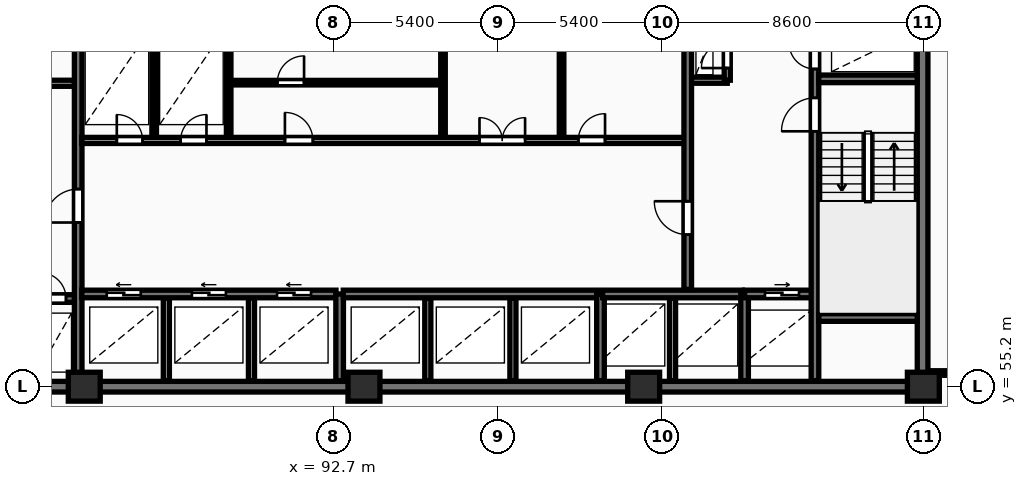
"""IFC4 building model, lengths in metres.
Left out: names, types, materials, properties, quantities, classifications, styles, units other than length and angle.
Written with IfcOpenShell. Run it as: python <this file> out.ifc"""

import sys

from ifc_helpers import new_model, si_unit, direction, frame, frame_2d, origin, origin_2d, place, context, subcontext, project, spatial, rectangle, extrude, element, fill, save


model = new_model("IFC4")
c1 = context("Model", 3, precision=1e-05, world=origin(), true_north=direction((0.0, 1.0)))
c2 = subcontext(c1, "Body", "Model", "MODEL_VIEW")
j1 = project(units=[si_unit("LENGTHUNIT", "METRE"), si_unit("PLANEANGLEUNIT", "RADIAN")], contexts=[c1])
p1 = place(None, origin())
s1 = spatial("IfcSite", under=j1, at=p1, CompositionType="ELEMENT")
p2 = place(p1, origin())
s2 = spatial("IfcBuilding", under=s1, at=p2, CompositionType="ELEMENT")
p3 = place(p2, frame((0.0, 0.0, 24.0)))
s3 = spatial("IfcBuildingStorey", under=s2, at=p3, CompositionType="ELEMENT", Elevation=24.0)
for number, where, z_axis, x_axis in (
    (1, (84.5, 55.2, 0.0), (0.0, 0.0, 1.0), (1.0, 0.0, 0.0)),
    (2, (93.7, 55.2, 0.0), (0.0, 0.0, 1.0), (1.0, 0.0, 0.0)),
    (3, (102.9, 55.2, 0.0), (0.0, 0.0, 1.0), (1.0, 0.0, 0.0)),
    (4, (112.1, 55.2, 0.0), (0.0, 0.0, 1.0), (1.0, 0.0, 0.0)),
):
    element("IfcColumn", number, at=place(p3, frame(where, z_axis=z_axis, x_axis=x_axis)), inside=s3, PredefinedType="COLUMN", context=c2, shape_type="SweptSolid", body=[
        extrude(rectangle(XDim=1.05, YDim=0.95, at=origin_2d()), origin(), (0.0, 0.0, 1.0), 3.25),
    ])
p4 = place(p3, frame((75.95, 55.2, 0.0), z_axis=(0.0, 0.0, 1.0), x_axis=(1.0, 0.0, 0.0)))
e5 = element("IfcWall", 5, at=p4, inside=s3, PredefinedType="SHEAR", context=c2, shape_type="SweptSolid", body=[
    extrude(rectangle(XDim=36.3, YDim=0.35, at=frame_2d((18.15, 0.0))), origin(), (0.0, 0.0, 1.0), 3.25),
])
p5 = place(p3, frame((112.075, 55.375, 0.0), z_axis=(0.0, 0.0, 1.0), x_axis=(0.0, 1.0, 0.0)))
e6 = element("IfcWall", 6, at=p5, inside=s3, PredefinedType="SHEAR", context=c2, shape_type="SweptSolid", body=[
    extrude(rectangle(XDim=11.65, YDim=0.35, at=frame_2d((5.825, 0.0))), origin(), (0.0, 0.0, 1.0), 3.25),
])
p6 = place(p3, frame((79.79, 58.1, 0.0), z_axis=(0.0, 0.0, 1.0), x_axis=(1.0, 0.0, 0.0)))
e7 = element("IfcWall", 7, at=p6, inside=s3, PredefinedType="SHEAR", context=c2, shape_type="SweptSolid", body=[
    extrude(rectangle(XDim=4.39, YDim=0.25, at=frame_2d((2.195, 0.0))), origin(), (0.0, 0.0, 1.0), 3.25),
])
p7 = place(p6, frame((1.05, 0.0, 0.0)))
e8 = element("IfcOpeningElement", 8, at=p7, cuts=e7, PredefinedType="OPENING", context=c2, shape_type="SweptSolid", body=[
    extrude(rectangle(XDim=1.12, YDim=2.12, at=frame_2d((0.56, 1.06))), frame((0.0, 0.135, 0.0), z_axis=(0.0, -1.0, 0.0), x_axis=(1.0, 0.0, 0.0)), (0.0, 0.0, 1.0), 0.27),
])
p8 = place(p6, frame((3.26, 0.0, 0.0)))
e9 = element("IfcOpeningElement", 9, at=p8, cuts=e7, PredefinedType="OPENING", context=c2, shape_type="SweptSolid", body=[
    extrude(rectangle(XDim=0.85, YDim=2.05, at=frame_2d((0.425, 1.025))), frame((0.0, 0.135, 0.0), z_axis=(0.0, -1.0, 0.0), x_axis=(1.0, 0.0, 0.0)), (0.0, 0.0, 1.0), 0.27),
])
p9 = place(p3, frame((79.79, 65.18, 0.0), z_axis=(0.0, 0.0, 1.0), x_axis=(1.0, 0.0, 0.0)))
e10 = element("IfcWall", 10, at=p9, inside=s3, PredefinedType="PARTITIONING", context=c2, shape_type="SweptSolid", body=[
    extrude(rectangle(XDim=4.39, YDim=0.2, at=frame_2d((2.195, 0.0))), origin(), (0.0, 0.0, 1.0), 2.97),
])
p10 = place(p9, frame((1.5, 0.0, 0.0)))
e11 = element("IfcOpeningElement", 11, at=p10, cuts=e10, PredefinedType="OPENING", context=c2, shape_type="SweptSolid", body=[
    extrude(rectangle(XDim=1.1, YDim=2.1, at=frame_2d((0.55, 1.05))), frame((0.0, 0.11, 0.0), z_axis=(0.0, -1.0, 0.0), x_axis=(1.0, 0.0, 0.0)), (0.0, 0.0, 1.0), 0.22),
])
p11 = place(p3, frame((84.3, 55.4, 0.0), z_axis=(0.0, 0.0, 1.0), x_axis=(0.0, 1.0, 0.0)))
e12 = element("IfcWall", 12, at=p11, inside=s3, PredefinedType="SHEAR", context=c2, shape_type="SweptSolid", body=[
    extrude(rectangle(XDim=11.6, YDim=0.25, at=frame_2d((5.8, 0.0))), origin(), (0.0, 0.0, 1.0), 3.25),
])
p12 = place(p11, frame((5.2, 0.0, 0.0)))
e13 = element("IfcOpeningElement", 13, at=p12, cuts=e12, PredefinedType="OPENING", context=c2, shape_type="SweptSolid", body=[
    extrude(rectangle(XDim=1.1, YDim=2.1, at=frame_2d((0.55, 1.05))), frame((0.0, 0.135, 0.0), z_axis=(0.0, -1.0, 0.0), x_axis=(1.0, 0.0, 0.0)), (0.0, 0.0, 1.0), 0.27),
])
for number, where, z_axis, x_axis in (
    (14, (87.2, 55.4, 0.0), (0.0, 0.0, 1.0), (0.0, 1.0, 0.0)),
    (15, (90.0, 55.4, 0.0), (0.0, 0.0, 1.0), (0.0, 1.0, 0.0)),
):
    element("IfcWall", number, at=place(p3, frame(where, z_axis=z_axis, x_axis=x_axis)), inside=s3, PredefinedType="PARTITIONING", context=c2, shape_type="SweptSolid", body=[
        extrude(rectangle(XDim=2.72, YDim=0.2, at=frame_2d((1.36, 0.0))), origin(), (0.0, 0.0, 1.0), 2.97),
    ])
p13 = place(p3, frame((84.42, 58.25, 0.0), z_axis=(0.0, 0.0, 1.0), x_axis=(1.0, 0.0, 0.0)))
e16 = element("IfcWall", 16, at=p13, inside=s3, PredefinedType="SHEAR", context=c2, shape_type="SweptSolid", body=[
    extrude(rectangle(XDim=8.36, YDim=0.25, at=frame_2d((4.18, 0.0))), origin(), (0.0, 0.0, 1.0), 3.25),
])
p14 = place(p13, frame((0.82, 0.0, 0.0)))
e17 = element("IfcOpeningElement", 17, at=p14, cuts=e16, PredefinedType="OPENING", context=c2, shape_type="SweptSolid", body=[
    extrude(rectangle(XDim=1.12, YDim=2.12, at=frame_2d((0.56, 1.06))), frame((0.0, 0.135, 0.0), z_axis=(0.0, -1.0, 0.0), x_axis=(1.0, 0.0, 0.0)), (0.0, 0.0, 1.0), 0.27),
])
p15 = place(p13, frame((3.62, 0.0, 0.0)))
e18 = element("IfcOpeningElement", 18, at=p15, cuts=e16, PredefinedType="OPENING", context=c2, shape_type="SweptSolid", body=[
    extrude(rectangle(XDim=1.12, YDim=2.12, at=frame_2d((0.56, 1.06))), frame((0.0, 0.135, 0.0), z_axis=(0.0, -1.0, 0.0), x_axis=(1.0, 0.0, 0.0)), (0.0, 0.0, 1.0), 0.27),
])
p16 = place(p13, frame((6.42, 0.0, 0.0)))
e19 = element("IfcOpeningElement", 19, at=p16, cuts=e16, PredefinedType="OPENING", context=c2, shape_type="SweptSolid", body=[
    extrude(rectangle(XDim=1.12, YDim=2.12, at=frame_2d((0.56, 1.06))), frame((0.0, 0.135, 0.0), z_axis=(0.0, -1.0, 0.0), x_axis=(1.0, 0.0, 0.0)), (0.0, 0.0, 1.0), 0.27),
])
p17 = place(p3, frame((92.9, 55.4, 0.0), z_axis=(0.0, 0.0, 1.0), x_axis=(0.0, 1.0, 0.0)))
e20 = element("IfcWall", 20, at=p17, inside=s3, PredefinedType="SHEAR", context=c2, shape_type="SweptSolid", body=[
    extrude(rectangle(XDim=2.85, YDim=0.25, at=frame_2d((1.425, 0.0))), origin(), (0.0, 0.0, 1.0), 3.25),
])
for number, where, z_axis, x_axis in (
    (21, (95.8, 55.4, 0.0), (0.0, 0.0, 1.0), (0.0, 1.0, 0.0)),
    (22, (98.6, 55.4, 0.0), (0.0, 0.0, 1.0), (0.0, 1.0, 0.0)),
):
    element("IfcWall", number, at=place(p3, frame(where, z_axis=z_axis, x_axis=x_axis)), inside=s3, PredefinedType="PARTITIONING", context=c2, shape_type="SweptSolid", body=[
        extrude(rectangle(XDim=2.72, YDim=0.2, at=frame_2d((1.36, 0.0))), origin(), (0.0, 0.0, 1.0), 2.97),
    ])
p18 = place(p3, frame((93.02, 58.25, 0.0), z_axis=(0.0, 0.0, 1.0), x_axis=(1.0, 0.0, 0.0)))
e23 = element("IfcWall", 23, at=p18, inside=s3, PredefinedType="SHEAR", context=c2, shape_type="SweptSolid", body=[
    extrude(rectangle(XDim=8.36, YDim=0.25, at=frame_2d((4.18, 0.0))), origin(), (0.0, 0.0, 1.0), 3.25),
])
p19 = place(p3, frame((101.48, 55.4, 0.0), z_axis=(0.0, 0.0, 1.0), x_axis=(0.0, 1.0, 0.0)))
e24 = element("IfcWall", 24, at=p19, inside=s3, PredefinedType="SHEAR", context=c2, shape_type="SweptSolid", body=[
    extrude(rectangle(XDim=2.85, YDim=0.25, at=frame_2d((1.425, 0.0))), origin(), (0.0, 0.0, 1.0), 3.25),
])
p20 = place(p3, frame((103.85, 55.4, 0.0), z_axis=(0.0, 0.0, 1.0), x_axis=(0.0, 1.0, 0.0)))
e25 = element("IfcWall", 25, at=p20, inside=s3, PredefinedType="PARTITIONING", context=c2, shape_type="SweptSolid", body=[
    extrude(rectangle(XDim=2.72, YDim=0.2, at=frame_2d((1.36, 0.0))), origin(), (0.0, 0.0, 1.0), 2.97),
])
p21 = place(p3, frame((101.55, 58.25, 0.0), z_axis=(0.0, 0.0, 1.0), x_axis=(1.0, 0.0, 0.0)))
e26 = element("IfcWall", 26, at=p21, inside=s3, PredefinedType="SHEAR", context=c2, shape_type="SweptSolid", body=[
    extrude(rectangle(XDim=4.6, YDim=0.25, at=frame_2d((2.3, 0.0))), origin(), (0.0, 0.0, 1.0), 3.25),
])
p22 = place(p3, frame((106.22, 55.4, 0.0), z_axis=(0.0, 0.0, 1.0), x_axis=(0.0, 1.0, 0.0)))
e27 = element("IfcWall", 27, at=p22, inside=s3, PredefinedType="SHEAR", context=c2, shape_type="SweptSolid", body=[
    extrude(rectangle(XDim=2.85, YDim=0.25, at=frame_2d((1.425, 0.0))), origin(), (0.0, 0.0, 1.0), 3.25),
])
p23 = place(p3, frame((106.22, 58.25, 0.0), z_axis=(0.0, 0.0, 1.0), x_axis=(1.0, 0.0, 0.0)))
e28 = element("IfcWall", 28, at=p23, inside=s3, PredefinedType="SHEAR", context=c2, shape_type="SweptSolid", body=[
    extrude(rectangle(XDim=2.46, YDim=0.25, at=frame_2d((1.23, 0.0))), origin(), (0.0, 0.0, 1.0), 3.25),
])
p24 = place(p23, frame((0.67, 0.0, 0.0)))
e29 = element("IfcOpeningElement", 29, at=p24, cuts=e28, PredefinedType="OPENING", context=c2, shape_type="SweptSolid", body=[
    extrude(rectangle(XDim=1.12, YDim=2.12, at=frame_2d((0.56, 1.06))), frame((0.0, 0.135, 0.0), z_axis=(0.0, -1.0, 0.0), x_axis=(1.0, 0.0, 0.0)), (0.0, 0.0, 1.0), 0.27),
])
for number, where, z_axis, x_axis in (
    (30, (86.8, 63.4, 0.0), (0.0, 0.0, 1.0), (0.0, 1.0, 0.0)),
    (31, (89.25, 63.4, 0.0), (0.0, 0.0, 1.0), (0.0, 1.0, 0.0)),
):
    element("IfcWall", number, at=place(p3, frame(where, z_axis=z_axis, x_axis=x_axis)), inside=s3, PredefinedType="PARTITIONING", context=c2, shape_type="SweptSolid", body=[
        extrude(rectangle(XDim=3.6, YDim=0.15, at=frame_2d((1.8, 0.0))), origin(), (0.0, 0.0, 1.0), 2.97),
    ])
p25 = place(p3, frame((89.25, 65.2, 0.0), z_axis=(0.0, 0.0, 1.0), x_axis=(1.0, 0.0, 0.0)))
e32 = element("IfcWall", 32, at=p25, inside=s3, PredefinedType="PARTITIONING", context=c2, shape_type="SweptSolid", body=[
    extrude(rectangle(XDim=7.05, YDim=0.15, at=frame_2d((3.525, 0.0))), origin(), (0.0, 0.0, 1.0), 2.97),
])
p26 = place(p25, frame((1.6, 0.0, 0.0)))
e33 = element("IfcOpeningElement", 33, at=p26, cuts=e32, PredefinedType="OPENING", context=c2, shape_type="SweptSolid", body=[
    extrude(rectangle(XDim=0.88, YDim=2.06, at=frame_2d((0.44, 1.03))), frame((0.0, 0.085, 0.0), z_axis=(0.0, -1.0, 0.0), x_axis=(1.0, 0.0, 0.0)), (0.0, 0.0, 1.0), 0.17),
])
for number, where, z_axis, x_axis in (
    (34, (96.3, 63.4, 0.0), (0.0, 0.0, 1.0), (0.0, 1.0, 0.0)),
    (35, (100.2, 63.4, 0.0), (0.0, 0.0, 1.0), (0.0, 1.0, 0.0)),
):
    element("IfcWall", number, at=place(p3, frame(where, z_axis=z_axis, x_axis=x_axis)), inside=s3, PredefinedType="PARTITIONING", context=c2, shape_type="SweptSolid", body=[
        extrude(rectangle(XDim=3.6, YDim=0.15, at=frame_2d((1.8, 0.0))), origin(), (0.0, 0.0, 1.0), 2.97),
    ])
p27 = place(p3, frame((84.42, 63.3, 0.0), z_axis=(0.0, 0.0, 1.0), x_axis=(1.0, 0.0, 0.0)))
e36 = element("IfcWall", 36, at=p27, inside=s3, PredefinedType="PARTITIONING", context=c2, shape_type="SweptSolid", body=[
    extrude(rectangle(XDim=19.83, YDim=0.2, at=frame_2d((9.915, 0.0))), origin(), (0.0, 0.0, 1.0), 2.97),
])
p28 = place(p27, frame((1.15, 0.0, 0.0)))
e37 = element("IfcOpeningElement", 37, at=p28, cuts=e36, PredefinedType="OPENING", context=c2, shape_type="SweptSolid", body=[
    extrude(rectangle(XDim=0.85, YDim=2.05, at=frame_2d((0.425, 1.025))), frame((0.0, 0.11, 0.0), z_axis=(0.0, -1.0, 0.0), x_axis=(1.0, 0.0, 0.0)), (0.0, 0.0, 1.0), 0.22),
])
p29 = place(p27, frame((3.25, 0.0, 0.0)))
e38 = element("IfcOpeningElement", 38, at=p29, cuts=e36, PredefinedType="OPENING", context=c2, shape_type="SweptSolid", body=[
    extrude(rectangle(XDim=0.85, YDim=2.05, at=frame_2d((0.425, 1.025))), frame((0.0, 0.11, 0.0), z_axis=(0.0, -1.0, 0.0), x_axis=(1.0, 0.0, 0.0)), (0.0, 0.0, 1.0), 0.22),
])
p30 = place(p27, frame((13.08, 0.0, 0.0)))
e39 = element("IfcOpeningElement", 39, at=p30, cuts=e36, PredefinedType="OPENING", context=c2, shape_type="SweptSolid", body=[
    extrude(rectangle(XDim=1.5, YDim=2.2, at=frame_2d((0.75, 1.1))), frame((0.0, 0.11, 0.0), z_axis=(0.0, -1.0, 0.0), x_axis=(1.0, 0.0, 0.0)), (0.0, 0.0, 1.0), 0.22),
])
p31 = place(p27, frame((6.68, 0.0, 0.0)))
e40 = element("IfcOpeningElement", 40, at=p31, cuts=e36, PredefinedType="OPENING", context=c2, shape_type="SweptSolid", body=[
    extrude(rectangle(XDim=0.92, YDim=2.08, at=frame_2d((0.46, 1.04))), frame((0.0, 0.11, 0.0), z_axis=(0.0, -1.0, 0.0), x_axis=(1.0, 0.0, 0.0)), (0.0, 0.0, 1.0), 0.22),
])
p32 = place(p27, frame((16.33, 0.0, 0.0)))
e41 = element("IfcOpeningElement", 41, at=p32, cuts=e36, PredefinedType="OPENING", context=c2, shape_type="SweptSolid", body=[
    extrude(rectangle(XDim=0.88, YDim=2.06, at=frame_2d((0.44, 1.03))), frame((0.0, 0.11, 0.0), z_axis=(0.0, -1.0, 0.0), x_axis=(1.0, 0.0, 0.0)), (0.0, 0.0, 1.0), 0.22),
])
p33 = place(p3, frame((104.45, 65.28, 0.0), z_axis=(0.0, 0.0, 1.0), x_axis=(1.0, 0.0, 0.0)))
e42 = element("IfcWall", 42, at=p33, inside=s3, PredefinedType="PARTITIONING", context=c2, shape_type="SweptSolid", body=[
    extrude(rectangle(XDim=1.2, YDim=0.2, at=frame_2d((0.6, 0.0))), origin(), (0.0, 0.0, 1.0), 2.97),
])
p34 = place(p3, frame((105.65, 65.28, 0.0), z_axis=(0.0, 0.0, 1.0), x_axis=(0.0, 1.0, 0.0)))
e43 = element("IfcWall", 43, at=p34, inside=s3, PredefinedType="PARTITIONING", context=c2, shape_type="SweptSolid", body=[
    extrude(rectangle(XDim=1.72, YDim=0.2, at=frame_2d((0.86, 0.0))), origin(), (0.0, 0.0, 1.0), 2.97),
])
p35 = place(p34, frame((0.4, 0.0, 0.0)))
e44 = element("IfcOpeningElement", 44, at=p35, cuts=e43, PredefinedType="OPENING", context=c2, shape_type="SweptSolid", body=[
    extrude(rectangle(XDim=0.85, YDim=2.05, at=frame_2d((0.425, 1.025))), frame((0.0, 0.11, 0.0), z_axis=(0.0, -1.0, 0.0), x_axis=(1.0, 0.0, 0.0)), (0.0, 0.0, 1.0), 0.22),
])
p36 = place(p3, frame((104.35, 58.4, 0.0), z_axis=(0.0, 0.0, 1.0), x_axis=(0.0, 1.0, 0.0)))
e45 = element("IfcWall", 45, at=p36, inside=s3, PredefinedType="SHEAR", context=c2, shape_type="SweptSolid", body=[
    extrude(rectangle(XDim=8.6, YDim=0.25, at=frame_2d((4.3, 0.0))), origin(), (0.0, 0.0, 1.0), 3.25),
])
p37 = place(p36, frame((1.8, 0.0, 0.0)))
e46 = element("IfcOpeningElement", 46, at=p37, cuts=e45, PredefinedType="OPENING", context=c2, shape_type="SweptSolid", body=[
    extrude(rectangle(XDim=1.1, YDim=2.1, at=frame_2d((0.55, 1.05))), frame((0.0, 0.135, 0.0), z_axis=(0.0, -1.0, 0.0), x_axis=(1.0, 0.0, 0.0)), (0.0, 0.0, 1.0), 0.27),
])
p38 = place(p3, frame((108.535, 55.4, 0.0), z_axis=(0.0, 0.0, 1.0), x_axis=(0.0, 1.0, 0.0)))
e47 = element("IfcWall", 47, at=p38, inside=s3, PredefinedType="SHEAR", context=c2, shape_type="SweptSolid", body=[
    extrude(rectangle(XDim=11.6, YDim=0.25, at=frame_2d((5.8, 0.0))), origin(), (0.0, 0.0, 1.0), 3.25),
])
p39 = place(p38, frame((8.2, 0.0, 0.0)))
e48 = element("IfcOpeningElement", 48, at=p39, cuts=e47, PredefinedType="OPENING", context=c2, shape_type="SweptSolid", body=[
    extrude(rectangle(XDim=1.1, YDim=2.1, at=frame_2d((0.55, 1.05))), frame((0.0, 0.135, 0.0), z_axis=(0.0, -1.0, 0.0), x_axis=(1.0, 0.0, 0.0)), (0.0, 0.0, 1.0), 0.27),
])
p40 = place(p38, frame((10.25, 0.0, 0.0)))
e49 = element("IfcOpeningElement", 49, at=p40, cuts=e47, PredefinedType="OPENING", context=c2, shape_type="SweptSolid", body=[
    extrude(rectangle(XDim=0.85, YDim=2.05, at=frame_2d((0.425, 1.025))), frame((0.0, 0.135, 0.0), z_axis=(0.0, -1.0, 0.0), x_axis=(1.0, 0.0, 0.0)), (0.0, 0.0, 1.0), 0.27),
])
for number, where, z_axis, x_axis in (
    (50, (108.66, 57.475, 0.0), (0.0, 0.0, 1.0), (1.0, 0.0, 0.0)),
    (51, (108.66, 65.325, 0.0), (0.0, 0.0, 1.0), (1.0, 0.0, 0.0)),
):
    element("IfcWall", number, at=place(p3, frame(where, z_axis=z_axis, x_axis=x_axis)), inside=s3, PredefinedType="SHEAR", context=c2, shape_type="SweptSolid", body=[
        extrude(rectangle(XDim=3.24, YDim=0.25, at=frame_2d((1.62, 0.0))), origin(), (0.0, 0.0, 1.0), 3.25),
    ])
p41 = place(p3, frame((112.27, 55.65, 0.0), z_axis=(0.0, 0.0, 1.0), x_axis=(1.0, 0.0, 0.0)))
e52 = element("IfcWall", 52, at=p41, inside=s3, PredefinedType="PARTITIONING", context=c2, shape_type="SweptSolid", body=[
    extrude(rectangle(XDim=6.76, YDim=0.15, at=frame_2d((3.38, 0.0))), origin(), (0.0, 0.0, 1.0), 2.97),
])
p42 = place(p41, frame((1.64, 0.0, 0.0)))
e53 = element("IfcOpeningElement", 53, at=p42, cuts=e52, PredefinedType="OPENING", context=c2, shape_type="SweptSolid", body=[
    extrude(rectangle(XDim=0.84, YDim=2.04, at=frame_2d((0.42, 1.02))), frame((0.0, 0.085, 0.0), z_axis=(0.0, -1.0, 0.0), x_axis=(1.0, 0.0, 0.0)), (0.0, 0.0, 1.0), 0.17),
])
p43 = place(p41, frame((3.16, 0.0, 0.0)))
e54 = element("IfcOpeningElement", 54, at=p43, cuts=e52, PredefinedType="OPENING", context=c2, shape_type="SweptSolid", body=[
    extrude(rectangle(XDim=0.88, YDim=2.06, at=frame_2d((0.44, 1.03))), frame((0.0, 0.085, 0.0), z_axis=(0.0, -1.0, 0.0), x_axis=(1.0, 0.0, 0.0)), (0.0, 0.0, 1.0), 0.17),
])
p44 = place(p8, origin())
e55 = element("IfcDoor", 55, at=p44, inside=s3, OperationType="SINGLE_SWING_LEFT", PredefinedType="DOOR", context=c2, shape_type="SweptSolid", body=[
    extrude(rectangle(XDim=0.85, YDim=2.05, at=frame_2d((0.425, 1.025))), frame((0.0, 0.025, 0.0), z_axis=(0.0, -1.0, 0.0), x_axis=(1.0, 0.0, 0.0)), (0.0, 0.0, 1.0), 0.05),
])
fill(e9, e55)
p45 = place(p12, origin())
e56 = element("IfcDoor", 56, at=p45, inside=s3, OperationType="SINGLE_SWING_LEFT", PredefinedType="DOOR", context=c2, shape_type="SweptSolid", body=[
    extrude(rectangle(XDim=1.1, YDim=2.1, at=frame_2d((0.55, 1.05))), frame((0.0, 0.025, 0.0), z_axis=(0.0, -1.0, 0.0), x_axis=(1.0, 0.0, 0.0)), (0.0, 0.0, 1.0), 0.05),
])
fill(e13, e56)
p46 = place(p14, origin())
e57 = element("IfcDoor", 57, at=p46, inside=s3, OperationType="SLIDING_TO_LEFT", PredefinedType="DOOR", context=c2, shape_type="SweptSolid", body=[
    extrude(rectangle(XDim=1.12, YDim=2.12, at=frame_2d((0.56, 1.06))), frame((0.0, 0.025, 0.0), z_axis=(0.0, -1.0, 0.0), x_axis=(1.0, 0.0, 0.0)), (0.0, 0.0, 1.0), 0.05),
])
fill(e17, e57)
p47 = place(p15, origin())
e58 = element("IfcDoor", 58, at=p47, inside=s3, OperationType="SLIDING_TO_LEFT", PredefinedType="DOOR", context=c2, shape_type="SweptSolid", body=[
    extrude(rectangle(XDim=1.12, YDim=2.12, at=frame_2d((0.56, 1.06))), frame((0.0, 0.025, 0.0), z_axis=(0.0, -1.0, 0.0), x_axis=(1.0, 0.0, 0.0)), (0.0, 0.0, 1.0), 0.05),
])
fill(e18, e58)
p48 = place(p16, origin())
e59 = element("IfcDoor", 59, at=p48, inside=s3, OperationType="SLIDING_TO_LEFT", PredefinedType="DOOR", context=c2, shape_type="SweptSolid", body=[
    extrude(rectangle(XDim=1.12, YDim=2.12, at=frame_2d((0.56, 1.06))), frame((0.0, 0.025, 0.0), z_axis=(0.0, -1.0, 0.0), x_axis=(1.0, 0.0, 0.0)), (0.0, 0.0, 1.0), 0.05),
])
fill(e19, e59)
p49 = place(p24, origin())
e60 = element("IfcDoor", 60, at=p49, inside=s3, OperationType="SLIDING_TO_RIGHT", PredefinedType="DOOR", context=c2, shape_type="SweptSolid", body=[
    extrude(rectangle(XDim=1.12, YDim=2.12, at=frame_2d((0.56, 1.06))), frame((0.0, 0.025, 0.0), z_axis=(0.0, -1.0, 0.0), x_axis=(1.0, 0.0, 0.0)), (0.0, 0.0, 1.0), 0.05),
])
fill(e29, e60)
p50 = place(p26, origin())
e61 = element("IfcDoor", 61, at=p50, inside=s3, OperationType="SINGLE_SWING_RIGHT", PredefinedType="DOOR", context=c2, shape_type="SweptSolid", body=[
    extrude(rectangle(XDim=0.88, YDim=2.06, at=frame_2d((0.44, 1.03))), frame((0.0, 0.025, 0.0), z_axis=(0.0, -1.0, 0.0), x_axis=(1.0, 0.0, 0.0)), (0.0, 0.0, 1.0), 0.05),
])
fill(e33, e61)
p51 = place(p28, origin())
e62 = element("IfcDoor", 62, at=p51, inside=s3, OperationType="SINGLE_SWING_LEFT", PredefinedType="DOOR", context=c2, shape_type="SweptSolid", body=[
    extrude(rectangle(XDim=0.85, YDim=2.05, at=frame_2d((0.425, 1.025))), frame((0.0, 0.025, 0.0), z_axis=(0.0, -1.0, 0.0), x_axis=(1.0, 0.0, 0.0)), (0.0, 0.0, 1.0), 0.05),
])
fill(e37, e62)
p52 = place(p29, origin())
e63 = element("IfcDoor", 63, at=p52, inside=s3, OperationType="SINGLE_SWING_RIGHT", PredefinedType="DOOR", context=c2, shape_type="SweptSolid", body=[
    extrude(rectangle(XDim=0.85, YDim=2.05, at=frame_2d((0.425, 1.025))), frame((0.0, 0.025, 0.0), z_axis=(0.0, -1.0, 0.0), x_axis=(1.0, 0.0, 0.0)), (0.0, 0.0, 1.0), 0.05),
])
fill(e38, e63)
p53 = place(p30, origin())
e64 = element("IfcDoor", 64, at=p53, inside=s3, OperationType="DOUBLE_DOOR_SINGLE_SWING", PredefinedType="DOOR", context=c2, shape_type="SweptSolid", body=[
    extrude(rectangle(XDim=1.5, YDim=2.2, at=frame_2d((0.75, 1.1))), frame((0.0, 0.025, 0.0), z_axis=(0.0, -1.0, 0.0), x_axis=(1.0, 0.0, 0.0)), (0.0, 0.0, 1.0), 0.05),
])
fill(e39, e64)
p54 = place(p31, origin())
e65 = element("IfcDoor", 65, at=p54, inside=s3, OperationType="SINGLE_SWING_LEFT", PredefinedType="DOOR", context=c2, shape_type="SweptSolid", body=[
    extrude(rectangle(XDim=0.92, YDim=2.08, at=frame_2d((0.46, 1.04))), frame((0.0, 0.025, 0.0), z_axis=(0.0, -1.0, 0.0), x_axis=(1.0, 0.0, 0.0)), (0.0, 0.0, 1.0), 0.05),
])
fill(e40, e65)
p55 = place(p32, origin())
e66 = element("IfcDoor", 66, at=p55, inside=s3, OperationType="SINGLE_SWING_RIGHT", PredefinedType="DOOR", context=c2, shape_type="SweptSolid", body=[
    extrude(rectangle(XDim=0.88, YDim=2.06, at=frame_2d((0.44, 1.03))), frame((0.0, 0.025, 0.0), z_axis=(0.0, -1.0, 0.0), x_axis=(1.0, 0.0, 0.0)), (0.0, 0.0, 1.0), 0.05),
])
fill(e41, e66)
p56 = place(p35, origin())
e67 = element("IfcDoor", 67, at=p56, inside=s3, OperationType="SINGLE_SWING_LEFT", PredefinedType="DOOR", context=c2, shape_type="SweptSolid", body=[
    extrude(rectangle(XDim=0.85, YDim=2.05, at=frame_2d((0.425, 1.025))), frame((0.0, 0.025, 0.0), z_axis=(0.0, -1.0, 0.0), x_axis=(1.0, 0.0, 0.0)), (0.0, 0.0, 1.0), 0.05),
])
fill(e44, e67)
p57 = place(p37, origin())
e68 = element("IfcDoor", 68, at=p57, inside=s3, OperationType="SINGLE_SWING_RIGHT", PredefinedType="DOOR", context=c2, shape_type="SweptSolid", body=[
    extrude(rectangle(XDim=1.1, YDim=2.1, at=frame_2d((0.55, 1.05))), frame((0.0, 0.025, 0.0), z_axis=(0.0, -1.0, 0.0), x_axis=(1.0, 0.0, 0.0)), (0.0, 0.0, 1.0), 0.05),
])
fill(e46, e68)
p58 = place(p39, origin())
e69 = element("IfcDoor", 69, at=p58, inside=s3, OperationType="SINGLE_SWING_LEFT", PredefinedType="DOOR", context=c2, shape_type="SweptSolid", body=[
    extrude(rectangle(XDim=1.1, YDim=2.1, at=frame_2d((0.55, 1.05))), frame((0.0, 0.025, 0.0), z_axis=(0.0, -1.0, 0.0), x_axis=(1.0, 0.0, 0.0)), (0.0, 0.0, 1.0), 0.05),
])
fill(e48, e69)
p59 = place(p40, origin())
e70 = element("IfcDoor", 70, at=p59, inside=s3, OperationType="SINGLE_SWING_RIGHT", PredefinedType="DOOR", context=c2, shape_type="SweptSolid", body=[
    extrude(rectangle(XDim=0.85, YDim=2.05, at=frame_2d((0.425, 1.025))), frame((0.0, 0.025, 0.0), z_axis=(0.0, -1.0, 0.0), x_axis=(1.0, 0.0, 0.0)), (0.0, 0.0, 1.0), 0.05),
])
fill(e49, e70)
save(model, sys.argv[1])
